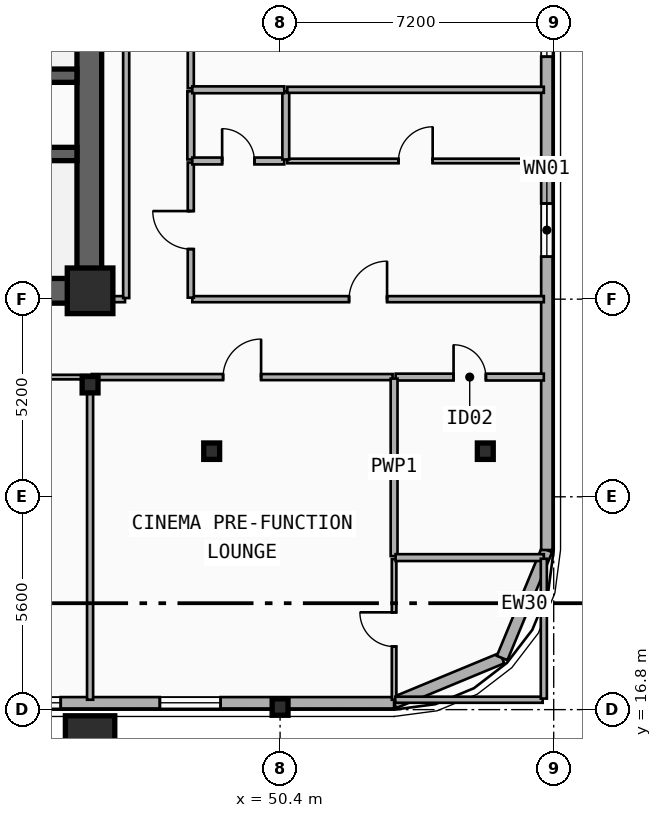
"""IFC4 building model, lengths in metres.
Left out: names, types, materials, properties, quantities, classifications, styles, units other than length and angle.
Written with IfcOpenShell. Run it as: python <this file> out.ifc"""

import sys

from ifc_helpers import new_model, si_unit, direction, frame, frame_2d, origin, origin_2d, place, context, subcontext, project, spatial, rectangle, i_section, extrude, element, fill, save


model = new_model("IFC4")
c1 = context("Model", 3, precision=1e-05, world=origin(), true_north=direction((0.0, 1.0)))
c2 = subcontext(c1, "Body", "Model", "MODEL_VIEW")
j1 = project(units=[si_unit("LENGTHUNIT", "METRE"), si_unit("PLANEANGLEUNIT", "RADIAN")], contexts=[c1])
p1 = place(None, origin())
s1 = spatial("IfcSite", under=j1, at=p1, CompositionType="ELEMENT")
p2 = place(p1, origin())
s2 = spatial("IfcBuilding", under=s1, at=p2, CompositionType="ELEMENT")
p3 = place(p2, frame((0.0, 0.0, 111.8)))
s3 = spatial("IfcBuildingStorey", under=s2, at=p3, CompositionType="ELEMENT", Elevation=111.8)
p4 = place(p3, frame((45.38, 27.82, 0.0), z_axis=(0.0, 0.0, 1.0), x_axis=(-1.0, 0.0, 0.0)))
e1 = element("IfcWall", 1, at=p4, inside=s3, PredefinedType="SHEAR", context=c2, shape_type="SweptSolid", body=[
    extrude(rectangle(XDim=12.23, YDim=0.65, at=frame_2d((6.115, 0.0))), origin(), (0.0, 0.0, 1.0), 3.5),
])
p5 = place(p4, frame((9.93, 0.0, 0.0)))
e2 = element("IfcOpeningElement", 2, at=p5, cuts=e1, PredefinedType="OPENING", context=c2, shape_type="SweptSolid", body=[
    extrude(rectangle(XDim=1.1, YDim=2.15, at=frame_2d((0.55, 1.075))), frame((0.0, 0.335, 0.0), z_axis=(0.0, -1.0, 0.0), x_axis=(1.0, 0.0, 0.0)), (0.0, 0.0, 1.0), 0.67),
])
p6 = place(p4, frame((6.23, 0.0, 0.0)))
e3 = element("IfcOpeningElement", 3, at=p6, cuts=e1, PredefinedType="OPENING", context=c2, shape_type="SweptSolid", body=[
    extrude(rectangle(XDim=1.1, YDim=2.15, at=frame_2d((0.55, 1.075))), frame((0.0, 0.335, 0.0), z_axis=(0.0, -1.0, 0.0), x_axis=(1.0, 0.0, 0.0)), (0.0, 0.0, 1.0), 0.67),
])
p7 = place(p3, frame((45.38, 28.145, 0.0), z_axis=(0.0, 0.0, 1.0), x_axis=(0.0, 1.0, 0.0)))
e4 = element("IfcWall", 4, at=p7, inside=s3, PredefinedType="SHEAR", context=c2, shape_type="SweptSolid", body=[
    extrude(rectangle(XDim=8.58, YDim=0.65, at=frame_2d((4.29, 0.0))), origin(), (0.0, 0.0, 1.0), 3.5),
])
p8 = place(p3, frame((45.055, 33.48, 0.0), z_axis=(0.0, 0.0, 1.0), x_axis=(-1.0, 0.0, 0.0)))
e5 = element("IfcWall", 5, at=p8, inside=s3, PredefinedType="SHEAR", context=c2, shape_type="SweptSolid", body=[
    extrude(rectangle(XDim=8.5, YDim=0.35, at=frame_2d((4.25, 0.0))), origin(), (0.0, 0.0, 1.0), 3.5),
])
p9 = place(p8, frame((7.155, 0.0, 0.0)))
e6 = element("IfcOpeningElement", 6, at=p9, cuts=e5, PredefinedType="OPENING", context=c2, shape_type="SweptSolid", body=[
    extrude(rectangle(XDim=1.1, YDim=2.15, at=frame_2d((0.55, 1.075))), frame((0.0, 0.185, 0.0), z_axis=(0.0, -1.0, 0.0), x_axis=(1.0, 0.0, 0.0)), (0.0, 0.0, 1.0), 0.37),
])
p10 = place(p3, frame((36.555, 31.42, 0.0), z_axis=(0.0, 0.0, 1.0), x_axis=(1.0, 0.0, 0.0)))
e7 = element("IfcWall", 7, at=p10, inside=s3, PredefinedType="SHEAR", context=c2, shape_type="SweptSolid", body=[
    extrude(rectangle(XDim=8.5, YDim=0.35, at=frame_2d((4.25, 0.0))), origin(), (0.0, 0.0, 1.0), 3.5),
])
p11 = place(p3, frame((45.4, 27.82, 0.0), z_axis=(0.0, 0.0, 1.0), x_axis=(1.0, 0.0, 0.0)))
e8 = element("IfcColumn", 8, at=p11, inside=s3, PredefinedType="COLUMN", context=c2, shape_type="SweptSolid", body=[
    extrude(rectangle(XDim=1.2, YDim=1.2, at=origin_2d()), origin(), (0.0, 0.0, 1.0), 3.5),
])
p12 = place(p3, frame((45.4, 25.35, 0.0), z_axis=(0.0, 0.0, 1.0), x_axis=(1.0, 0.0, 0.0)))
e9 = element("IfcColumn", 9, at=p12, inside=s3, PredefinedType="COLUMN", context=c2, shape_type="SweptSolid", body=[
    extrude(i_section(OverallWidth=0.418, OverallDepth=0.432, WebThickness=0.035, FlangeThickness=0.056, FilletRadius=0.015, at=origin_2d()), origin(), (0.0, 0.0, 1.0), 3.5),
])
p13 = place(p3, frame((45.4, 16.097, 0.0), z_axis=(0.0, -0.090241349316, 0.995919925935), x_axis=(1.0, 0.0, 0.0)))
e10 = element("IfcColumn", 10, at=p13, inside=s3, PredefinedType="COLUMN", context=c2, shape_type="SweptSolid", body=[
    extrude(rectangle(XDim=1.3, YDim=1.3, at=origin_2d()), origin(), (0.0, 0.0, 1.0), 3.514),
])
p14 = place(p3, frame((48.6, 23.6, 0.0), z_axis=(0.0, 0.0, 1.0), x_axis=(1.0, 0.0, 0.0)))
e11 = element("IfcColumn", 11, at=p14, inside=s3, PredefinedType="COLUMN", context=c2, shape_type="SweptSolid", body=[
    extrude(i_section(OverallWidth=0.418, OverallDepth=0.432, WebThickness=0.035, FlangeThickness=0.056, FilletRadius=0.015, at=origin_2d()), origin(), (0.0, 0.0, 1.0), 3.5),
])
p15 = place(p3, frame((50.4, 16.964, 0.0), z_axis=(0.0, -0.079891690793, 0.996803550226), x_axis=(1.0, 0.0, 0.0)))
e12 = element("IfcColumn", 12, at=p15, inside=s3, PredefinedType="COLUMN", context=c2, shape_type="SweptSolid", body=[
    extrude(i_section(OverallWidth=0.418, OverallDepth=0.432, WebThickness=0.035, FlangeThickness=0.056, FilletRadius=0.015, at=origin_2d()), origin(), (0.0, 0.0, 1.0), 3.511),
])
p16 = place(p3, frame((55.8, 23.6, 0.0), z_axis=(0.0, 0.0, 1.0), x_axis=(1.0, 0.0, 0.0)))
e13 = element("IfcColumn", 13, at=p16, inside=s3, PredefinedType="COLUMN", context=c2, shape_type="SweptSolid", body=[
    extrude(i_section(OverallWidth=0.418, OverallDepth=0.432, WebThickness=0.035, FlangeThickness=0.056, FilletRadius=0.015, at=origin_2d()), origin(), (0.0, 0.0, 1.0), 3.5),
])
p17 = place(p3, frame((56.243, 18.157, 0.0), z_axis=(0.0, 0.0, 1.0), x_axis=(-0.923882414032, -0.382676475685, 0.0)))
e14 = element("IfcWall", 14, at=p17, inside=s3, PredefinedType="SOLIDWALL", context=c2, shape_type="SweptSolid", body=[
    extrude(rectangle(XDim=3.077, YDim=0.3, at=frame_2d((1.539, 0.0))), origin(), (0.0, 0.0, 1.0), 3.24),
])
p18 = place(p3, frame((57.42, 21.0, 0.0), z_axis=(0.0, 0.0, 1.0), x_axis=(-0.382636798336, -0.92389884758, 0.0)))
e15 = element("IfcWall", 15, at=p18, inside=s3, PredefinedType="SOLIDWALL", context=c2, shape_type="SweptSolid", body=[
    extrude(rectangle(XDim=3.077, YDim=0.3, at=frame_2d((1.538, 0.0))), origin(), (0.0, 0.0, 1.0), 3.24),
])
p19 = place(p3, frame((57.42, 39.0, 0.0), z_axis=(0.0, 0.0, 1.0), x_axis=(0.0, -1.0, 0.0)))
e16 = element("IfcWall", 16, at=p19, inside=s3, PredefinedType="SOLIDWALL", context=c2, shape_type="SweptSolid", body=[
    extrude(rectangle(XDim=18.0, YDim=0.3, at=frame_2d((9.0, 0.0))), origin(), (0.0, 0.0, 1.0), 3.24),
])
p20 = place(p19, frame((8.882, 0.0, 0.48)))
e17 = element("IfcOpeningElement", 17, at=p20, cuts=e16, PredefinedType="OPENING", context=c2, shape_type="SweptSolid", body=[
    extrude(rectangle(XDim=1.4, YDim=1.8, at=frame_2d((0.7, 0.9))), frame((0.0, 0.16, 0.0), z_axis=(0.0, -1.0, 0.0), x_axis=(1.0, 0.0, 0.0)), (0.0, 0.0, 1.0), 0.32),
])
p21 = place(p19, frame((3.621, 0.0, 0.48)))
e18 = element("IfcOpeningElement", 18, at=p21, cuts=e16, PredefinedType="OPENING", context=c2, shape_type="SweptSolid", body=[
    extrude(rectangle(XDim=1.4, YDim=1.8, at=frame_2d((0.7, 0.9))), frame((0.0, 0.16, 0.0), z_axis=(0.0, -1.0, 0.0), x_axis=(1.0, 0.0, 0.0)), (0.0, 0.0, 1.0), 0.32),
])
p22 = place(p3, frame((53.4, 16.98, 0.0), z_axis=(0.0, 0.0, 1.0), x_axis=(-1.0, 0.0, 0.0)))
e19 = element("IfcWall", 19, at=p22, inside=s3, PredefinedType="SOLIDWALL", context=c2, shape_type="SweptSolid", body=[
    extrude(rectangle(XDim=49.2, YDim=0.3, at=frame_2d((24.6, 0.0))), origin(), (0.0, 0.0, 1.0), 3.24),
])
p23 = place(p22, frame((46.99, 0.0, 0.48)))
e20 = element("IfcOpeningElement", 20, at=p23, cuts=e19, PredefinedType="OPENING", context=c2, shape_type="SweptSolid", body=[
    extrude(rectangle(XDim=1.6, YDim=1.95, at=frame_2d((0.8, 0.975))), frame((0.0, 0.16, 0.0), z_axis=(0.0, -1.0, 0.0), x_axis=(1.0, 0.0, 0.0)), (0.0, 0.0, 1.0), 0.32),
])
p24 = place(p22, frame((39.228, 0.0, 1.22)))
e21 = element("IfcOpeningElement", 21, at=p24, cuts=e19, PredefinedType="OPENING", context=c2, shape_type="SweptSolid", body=[
    extrude(rectangle(XDim=1.2, YDim=1.5, at=frame_2d((0.6, 0.75))), frame((0.0, 0.16, 0.0), z_axis=(0.0, -1.0, 0.0), x_axis=(1.0, 0.0, 0.0)), (0.0, 0.0, 1.0), 0.32),
])
p25 = place(p22, frame((20.025, 0.0, 0.65)))
e22 = element("IfcOpeningElement", 22, at=p25, cuts=e19, PredefinedType="OPENING", context=c2, shape_type="SweptSolid", body=[
    extrude(rectangle(XDim=1.6, YDim=1.95, at=frame_2d((0.8, 0.975))), frame((0.0, 0.16, 0.0), z_axis=(0.0, -1.0, 0.0), x_axis=(1.0, 0.0, 0.0)), (0.0, 0.0, 1.0), 0.32),
])
p26 = place(p22, frame((8.772, 0.0, 0.48)))
e23 = element("IfcOpeningElement", 23, at=p26, cuts=e19, PredefinedType="OPENING", context=c2, shape_type="SweptSolid", body=[
    extrude(rectangle(XDim=1.2, YDim=1.5, at=frame_2d((0.6, 0.75))), frame((0.0, 0.16, 0.0), z_axis=(0.0, -1.0, 0.0), x_axis=(1.0, 0.0, 0.0)), (0.0, 0.0, 1.0), 0.32),
])
p27 = place(p22, frame((4.564, 0.0, 0.65)))
e24 = element("IfcOpeningElement", 24, at=p27, cuts=e19, PredefinedType="OPENING", context=c2, shape_type="SweptSolid", body=[
    extrude(rectangle(XDim=1.6, YDim=1.95, at=frame_2d((0.8, 0.975))), frame((0.0, 0.16, 0.0), z_axis=(0.0, -1.0, 0.0), x_axis=(1.0, 0.0, 0.0)), (0.0, 0.0, 1.0), 0.32),
])
p28 = place(p3, frame((48.09, 27.6, 0.0), z_axis=(0.0, 0.0, 1.0), x_axis=(1.0, 0.0, 0.0)))
e25 = element("IfcWall", 25, at=p28, inside=s3, PredefinedType="PARTITIONING", context=c2, shape_type="SweptSolid", body=[
    extrude(rectangle(XDim=9.25, YDim=0.16, at=frame_2d((4.625, 0.0))), origin(), (0.0, 0.0, 1.0), 2.57),
])
p29 = place(p28, frame((4.125, 0.0, 0.0)))
e26 = element("IfcOpeningElement", 26, at=p29, cuts=e25, PredefinedType="OPENING", context=c2, shape_type="SweptSolid", body=[
    extrude(rectangle(XDim=1.0, YDim=2.15, at=frame_2d((0.5, 1.075))), frame((0.0, 0.09, 0.0), z_axis=(0.0, -1.0, 0.0), x_axis=(1.0, 0.0, 0.0)), (0.0, 0.0, 1.0), 0.18),
])
p30 = place(p3, frame((38.39, 25.55, 0.0), z_axis=(0.0, 0.0, 1.0), x_axis=(1.0, 0.0, 0.0)))
e27 = element("IfcWall", 27, at=p30, inside=s3, PredefinedType="PARTITIONING", context=c2, shape_type="SweptSolid", body=[
    extrude(rectangle(XDim=6.97, YDim=0.12, at=frame_2d((3.485, 0.0))), origin(), (0.0, 0.0, 1.0), 2.31),
])
p31 = place(p30, frame((3.035, 0.0, 0.0)))
e28 = element("IfcOpeningElement", 28, at=p31, cuts=e27, PredefinedType="OPENING", context=c2, shape_type="SweptSolid", body=[
    extrude(rectangle(XDim=0.9, YDim=2.1, at=frame_2d((0.45, 1.05))), frame((0.0, 0.07, 0.0), z_axis=(0.0, -1.0, 0.0), x_axis=(1.0, 0.0, 0.0)), (0.0, 0.0, 1.0), 0.14),
])
p32 = place(p3, frame((45.44, 25.55, 0.0), z_axis=(0.0, 0.0, 1.0), x_axis=(1.0, 0.0, 0.0)))
e29 = element("IfcWall", 29, at=p32, inside=s3, PredefinedType="PARTITIONING", context=c2, shape_type="SweptSolid", body=[
    extrude(rectangle(XDim=7.92, YDim=0.16, at=frame_2d((3.96, 0.0))), origin(), (0.0, 0.0, 1.0), 2.31),
])
p33 = place(p32, frame((3.46, 0.0, 0.0)))
e30 = element("IfcOpeningElement", 30, at=p33, cuts=e29, PredefinedType="OPENING", context=c2, shape_type="SweptSolid", body=[
    extrude(rectangle(XDim=1.0, YDim=2.15, at=frame_2d((0.5, 1.075))), frame((0.0, 0.09, 0.0), z_axis=(0.0, -1.0, 0.0), x_axis=(1.0, 0.0, 0.0)), (0.0, 0.0, 1.0), 0.18),
])
p34 = place(p3, frame((53.44, 25.55, 0.0), z_axis=(0.0, 0.0, 1.0), x_axis=(1.0, 0.0, 0.0)))
e31 = element("IfcWall", 31, at=p34, inside=s3, PredefinedType="PLUMBINGWALL", context=c2, shape_type="SweptSolid", body=[
    extrude(rectangle(XDim=3.9, YDim=0.18, at=frame_2d((1.95, 0.0))), origin(), (0.0, 0.0, 1.0), 2.57),
])
p35 = place(p34, frame((1.525, 0.0, 0.0)))
e32 = element("IfcOpeningElement", 32, at=p35, cuts=e31, PredefinedType="OPENING", context=c2, shape_type="SweptSolid", body=[
    extrude(rectangle(XDim=0.85, YDim=2.1, at=frame_2d((0.425, 1.05))), frame((0.0, 0.1, 0.0), z_axis=(0.0, -1.0, 0.0), x_axis=(1.0, 0.0, 0.0)), (0.0, 0.0, 1.0), 0.2),
])
p36 = place(p3, frame((48.05, 27.64, 0.0), z_axis=(0.0, 0.0, 1.0), x_axis=(0.0, 1.0, 0.0)))
e33 = element("IfcWall", 33, at=p36, inside=s3, PredefinedType="PARTITIONING", context=c2, shape_type="SweptSolid", body=[
    extrude(rectangle(XDim=3.556, YDim=0.16, at=frame_2d((1.778, 0.0))), origin(), (0.0, 0.0, 1.0), 3.24),
])
p37 = place(p36, frame((1.278, 0.0, 0.0)))
e34 = element("IfcOpeningElement", 34, at=p37, cuts=e33, PredefinedType="OPENING", context=c2, shape_type="SweptSolid", body=[
    extrude(rectangle(XDim=1.0, YDim=2.15, at=frame_2d((0.5, 1.075))), frame((0.0, 0.09, 0.0), z_axis=(0.0, -1.0, 0.0), x_axis=(1.0, 0.0, 0.0)), (0.0, 0.0, 1.0), 0.18),
])
p38 = place(p3, frame((48.05, 31.276, 0.0), z_axis=(0.0, 0.0, 1.0), x_axis=(0.0, 1.0, 0.0)))
e35 = element("IfcWall", 35, at=p38, inside=s3, PredefinedType="PLUMBINGWALL", context=c2, shape_type="SweptSolid", body=[
    extrude(rectangle(XDim=1.793, YDim=0.18, at=frame_2d((0.896, 0.0))), origin(), (0.0, 0.0, 1.0), 3.24),
])
p39 = place(p3, frame((48.05, 33.149, 0.0), z_axis=(0.0, 0.0, 1.0), x_axis=(0.0, 1.0, 0.0)))
e36 = element("IfcWall", 36, at=p39, inside=s3, PredefinedType="PARTITIONING", context=c2, shape_type="SweptSolid", body=[
    extrude(rectangle(XDim=3.061, YDim=0.16, at=frame_2d((1.531, 0.0))), origin(), (0.0, 0.0, 1.0), 3.24),
])
p40 = place(p39, frame((1.031, 0.0, 0.0)))
e37 = element("IfcOpeningElement", 37, at=p40, cuts=e36, PredefinedType="OPENING", context=c2, shape_type="SweptSolid", body=[
    extrude(rectangle(XDim=1.0, YDim=2.15, at=frame_2d((0.5, 1.075))), frame((0.0, 0.09, 0.0), z_axis=(0.0, -1.0, 0.0), x_axis=(1.0, 0.0, 0.0)), (0.0, 0.0, 1.0), 0.18),
])
p41 = place(p3, frame((48.09, 31.236, 0.0), z_axis=(0.0, 0.0, 1.0), x_axis=(1.0, 0.0, 0.0)))
e38 = element("IfcWall", 38, at=p41, inside=s3, PredefinedType="PLUMBINGWALL", context=c2, shape_type="SweptSolid", body=[
    extrude(rectangle(XDim=2.42, YDim=0.18, at=frame_2d((1.21, 0.0))), origin(), (0.0, 0.0, 1.0), 2.57),
])
p42 = place(p41, frame((0.785, 0.0, 0.0)))
e39 = element("IfcOpeningElement", 39, at=p42, cuts=e38, PredefinedType="OPENING", context=c2, shape_type="SweptSolid", body=[
    extrude(rectangle(XDim=0.85, YDim=2.1, at=frame_2d((0.425, 1.05))), frame((0.0, 0.1, 0.0), z_axis=(0.0, -1.0, 0.0), x_axis=(1.0, 0.0, 0.0)), (0.0, 0.0, 1.0), 0.2),
])
p43 = place(p3, frame((50.59, 31.236, 0.0), z_axis=(0.0, 0.0, 1.0), x_axis=(1.0, 0.0, 0.0)))
e40 = element("IfcWall", 40, at=p43, inside=s3, PredefinedType="PARTITIONING", context=c2, shape_type="SweptSolid", body=[
    extrude(rectangle(XDim=6.75, YDim=0.12, at=frame_2d((3.375, 0.0))), origin(), (0.0, 0.0, 1.0), 2.57),
])
p44 = place(p43, frame((2.925, 0.0, 0.0)))
e41 = element("IfcOpeningElement", 41, at=p44, cuts=e40, PredefinedType="OPENING", context=c2, shape_type="SweptSolid", body=[
    extrude(rectangle(XDim=0.9, YDim=2.1, at=frame_2d((0.45, 1.05))), frame((0.0, 0.07, 0.0), z_axis=(0.0, -1.0, 0.0), x_axis=(1.0, 0.0, 0.0)), (0.0, 0.0, 1.0), 0.14),
])
p45 = place(p3, frame((50.55, 31.276, 0.0), z_axis=(0.0, 0.0, 1.0), x_axis=(0.0, 1.0, 0.0)))
e42 = element("IfcWall", 42, at=p45, inside=s3, PredefinedType="PLUMBINGWALL", context=c2, shape_type="SweptSolid", body=[
    extrude(rectangle(XDim=1.793, YDim=0.18, at=frame_2d((0.896, 0.0))), origin(), (0.0, 0.0, 1.0), 2.57),
])
p46 = place(p3, frame((48.09, 33.109, 0.0), z_axis=(0.0, 0.0, 1.0), x_axis=(1.0, 0.0, 0.0)))
e43 = element("IfcWall", 43, at=p46, inside=s3, PredefinedType="PLUMBINGWALL", context=c2, shape_type="SweptSolid", body=[
    extrude(rectangle(XDim=2.42, YDim=0.18, at=frame_2d((1.21, 0.0))), origin(), (0.0, 0.0, 1.0), 2.57),
])
p47 = place(p3, frame((50.59, 33.109, 0.0), z_axis=(0.0, 0.0, 1.0), x_axis=(1.0, 0.0, 0.0)))
e44 = element("IfcWall", 44, at=p47, inside=s3, PredefinedType="PARTITIONING", context=c2, shape_type="SweptSolid", body=[
    extrude(rectangle(XDim=6.75, YDim=0.16, at=frame_2d((3.375, 0.0))), origin(), (0.0, 0.0, 1.0), 2.57),
])
p48 = place(p3, frame((45.4, 17.06, 0.0), z_axis=(0.0, 0.0, 1.0), x_axis=(0.0, 1.0, 0.0)))
e45 = element("IfcWall", 45, at=p48, inside=s3, PredefinedType="PARTITIONING", context=c2, shape_type="SweptSolid", body=[
    extrude(rectangle(XDim=8.45, YDim=0.16, at=frame_2d((4.225, 0.0))), origin(), (0.0, 0.0, 1.0), 2.31),
])
p49 = place(p3, frame((53.4, 17.06, 0.0), z_axis=(0.0, 0.0, 1.0), x_axis=(0.0, 1.0, 0.0)))
e46 = element("IfcWall", 46, at=p49, inside=s3, PredefinedType="PARTITIONING", context=c2, shape_type="SweptSolid", body=[
    extrude(rectangle(XDim=3.7, YDim=0.12, at=frame_2d((1.85, 0.0))), origin(), (0.0, 0.0, 1.0), 2.72),
])
p50 = place(p49, frame((1.4, 0.0, 0.0)))
e47 = element("IfcOpeningElement", 47, at=p50, cuts=e46, PredefinedType="OPENING", context=c2, shape_type="SweptSolid", body=[
    extrude(rectangle(XDim=0.9, YDim=2.1, at=frame_2d((0.45, 1.05))), frame((0.0, 0.07, 0.0), z_axis=(0.0, -1.0, 0.0), x_axis=(1.0, 0.0, 0.0)), (0.0, 0.0, 1.0), 0.14),
])
p51 = place(p3, frame((53.4, 20.84, 0.0), z_axis=(0.0, 0.0, 1.0), x_axis=(0.0, 1.0, 0.0)))
e48 = element("IfcWall", 48, at=p51, inside=s3, PredefinedType="PLUMBINGWALL", context=c2, shape_type="SweptSolid", body=[
    extrude(rectangle(XDim=4.67, YDim=0.18, at=frame_2d((2.335, 0.0))), origin(), (0.0, 0.0, 1.0), 2.72),
])
p52 = place(p3, frame((53.44, 20.8, 0.0), z_axis=(0.0, 0.0, 1.0), x_axis=(1.0, 0.0, 0.0)))
e49 = element("IfcWall", 49, at=p52, inside=s3, PredefinedType="PLUMBINGWALL", context=c2, shape_type="SweptSolid", body=[
    extrude(rectangle(XDim=3.9, YDim=0.18, at=frame_2d((1.95, 0.0))), origin(), (0.0, 0.0, 1.0), 2.72),
])
p53 = place(p3, frame((45.41, 27.6, 0.0), z_axis=(0.0, 0.0, 1.0), x_axis=(1.0, 0.0, 0.0)))
e50 = element("IfcWall", 50, at=p53, inside=s3, PredefinedType="PARTITIONING", context=c2, shape_type="SweptSolid", body=[
    extrude(rectangle(XDim=0.91, YDim=0.16, at=frame_2d((0.455, 0.0))), origin(), (0.0, 0.0, 1.0), 2.28),
])
p54 = place(p3, frame((46.35, 27.63, 0.0), z_axis=(0.0, 0.0, 1.0), x_axis=(0.0, 1.0, 0.0)))
e51 = element("IfcWall", 51, at=p54, inside=s3, PredefinedType="PARTITIONING", context=c2, shape_type="SweptSolid", body=[
    extrude(rectangle(XDim=10.24, YDim=0.16, at=frame_2d((5.12, 0.0))), origin(), (0.0, 0.0, 1.0), 2.72),
])
p55 = place(p3, frame((53.43, 17.06, 0.0), z_axis=(0.0, 0.0, 1.0), x_axis=(1.0, 0.0, 0.0)))
e52 = element("IfcWall", 52, at=p55, inside=s3, PredefinedType="PARTITIONING", context=c2, shape_type="SweptSolid", body=[
    extrude(rectangle(XDim=3.88, YDim=0.16, at=frame_2d((1.94, 0.0))), origin(), (0.0, 0.0, 1.0), 2.72),
])
p56 = place(p3, frame((57.34, 17.09, 0.0), z_axis=(0.0, 0.0, 1.0), x_axis=(0.0, 1.0, 0.0)))
e53 = element("IfcWall", 53, at=p56, inside=s3, PredefinedType="PARTITIONING", context=c2, shape_type="SweptSolid", body=[
    extrude(rectangle(XDim=3.68, YDim=0.16, at=frame_2d((1.84, 0.0))), origin(), (0.0, 0.0, 1.0), 3.24),
])
p57 = place(p20, origin())
e54 = element("IfcWindow", 54, at=p57, inside=s3, PartitioningType="SINGLE_PANEL", PredefinedType="WINDOW", context=c2, shape_type="SweptSolid", body=[
    extrude(rectangle(XDim=1.4, YDim=1.8, at=frame_2d((0.7, 0.9))), frame((0.0, 0.03, 0.0), z_axis=(0.0, -1.0, 0.0), x_axis=(1.0, 0.0, 0.0)), (0.0, 0.0, 1.0), 0.06),
])
fill(e17, e54)
p58 = place(p21, origin())
e55 = element("IfcWindow", 55, at=p58, inside=s3, PartitioningType="SINGLE_PANEL", PredefinedType="WINDOW", context=c2, shape_type="SweptSolid", body=[
    extrude(rectangle(XDim=1.4, YDim=1.8, at=frame_2d((0.7, 0.9))), frame((0.0, 0.03, 0.0), z_axis=(0.0, -1.0, 0.0), x_axis=(1.0, 0.0, 0.0)), (0.0, 0.0, 1.0), 0.06),
])
fill(e18, e55)
p59 = place(p26, origin())
e56 = element("IfcWindow", 56, at=p59, inside=s3, PartitioningType="SINGLE_PANEL", PredefinedType="WINDOW", context=c2, shape_type="SweptSolid", body=[
    extrude(rectangle(XDim=1.2, YDim=1.5, at=frame_2d((0.6, 0.75))), frame((0.0, 0.03, 0.0), z_axis=(0.0, -1.0, 0.0), x_axis=(1.0, 0.0, 0.0)), (0.0, 0.0, 1.0), 0.06),
])
fill(e23, e56)
p60 = place(p27, origin())
e57 = element("IfcWindow", 57, at=p60, inside=s3, PartitioningType="SINGLE_PANEL", PredefinedType="WINDOW", context=c2, shape_type="SweptSolid", body=[
    extrude(rectangle(XDim=1.6, YDim=1.95, at=frame_2d((0.8, 0.975))), frame((0.0, 0.03, 0.0), z_axis=(0.0, -1.0, 0.0), x_axis=(1.0, 0.0, 0.0)), (0.0, 0.0, 1.0), 0.06),
])
fill(e24, e57)
p61 = place(p29, origin())
e58 = element("IfcDoor", 58, at=p61, inside=s3, OperationType="SINGLE_SWING_RIGHT", PredefinedType="DOOR", context=c2, shape_type="SweptSolid", body=[
    extrude(rectangle(XDim=1.0, YDim=2.15, at=frame_2d((0.5, 1.075))), frame((0.0, 0.025, 0.0), z_axis=(0.0, -1.0, 0.0), x_axis=(1.0, 0.0, 0.0)), (0.0, 0.0, 1.0), 0.05),
])
fill(e26, e58)
p62 = place(p33, origin())
e59 = element("IfcDoor", 59, at=p62, inside=s3, OperationType="SINGLE_SWING_RIGHT", PredefinedType="DOOR", context=c2, shape_type="SweptSolid", body=[
    extrude(rectangle(XDim=1.0, YDim=2.15, at=frame_2d((0.5, 1.075))), frame((0.0, 0.025, 0.0), z_axis=(0.0, -1.0, 0.0), x_axis=(1.0, 0.0, 0.0)), (0.0, 0.0, 1.0), 0.05),
])
fill(e30, e59)
p63 = place(p35, origin())
e60 = element("IfcDoor", 60, at=p63, inside=s3, OperationType="SINGLE_SWING_LEFT", PredefinedType="DOOR", context=c2, shape_type="SweptSolid", body=[
    extrude(rectangle(XDim=0.85, YDim=2.1, at=frame_2d((0.425, 1.05))), frame((0.0, 0.025, 0.0), z_axis=(0.0, -1.0, 0.0), x_axis=(1.0, 0.0, 0.0)), (0.0, 0.0, 1.0), 0.05),
])
fill(e32, e60)
p64 = place(p37, origin())
e61 = element("IfcDoor", 61, at=p64, inside=s3, OperationType="SINGLE_SWING_RIGHT", PredefinedType="DOOR", context=c2, shape_type="SweptSolid", body=[
    extrude(rectangle(XDim=1.0, YDim=2.15, at=frame_2d((0.5, 1.075))), frame((0.0, 0.025, 0.0), z_axis=(0.0, -1.0, 0.0), x_axis=(1.0, 0.0, 0.0)), (0.0, 0.0, 1.0), 0.05),
])
fill(e34, e61)
p65 = place(p42, origin())
e62 = element("IfcDoor", 62, at=p65, inside=s3, OperationType="SINGLE_SWING_LEFT", PredefinedType="DOOR", context=c2, shape_type="SweptSolid", body=[
    extrude(rectangle(XDim=0.85, YDim=2.1, at=frame_2d((0.425, 1.05))), frame((0.0, 0.025, 0.0), z_axis=(0.0, -1.0, 0.0), x_axis=(1.0, 0.0, 0.0)), (0.0, 0.0, 1.0), 0.05),
])
fill(e39, e62)
p66 = place(p44, origin())
e63 = element("IfcDoor", 63, at=p66, inside=s3, OperationType="SINGLE_SWING_RIGHT", PredefinedType="DOOR", context=c2, shape_type="SweptSolid", body=[
    extrude(rectangle(XDim=0.9, YDim=2.1, at=frame_2d((0.45, 1.05))), frame((0.0, 0.025, 0.0), z_axis=(0.0, -1.0, 0.0), x_axis=(1.0, 0.0, 0.0)), (0.0, 0.0, 1.0), 0.05),
])
fill(e41, e63)
p67 = place(p50, origin())
e64 = element("IfcDoor", 64, at=p67, inside=s3, OperationType="SINGLE_SWING_RIGHT", PredefinedType="DOOR", context=c2, shape_type="SweptSolid", body=[
    extrude(rectangle(XDim=0.9, YDim=2.1, at=frame_2d((0.45, 1.05))), frame((0.0, 0.025, 0.0), z_axis=(0.0, -1.0, 0.0), x_axis=(1.0, 0.0, 0.0)), (0.0, 0.0, 1.0), 0.05),
])
fill(e47, e64)
save(model, sys.argv[1])
